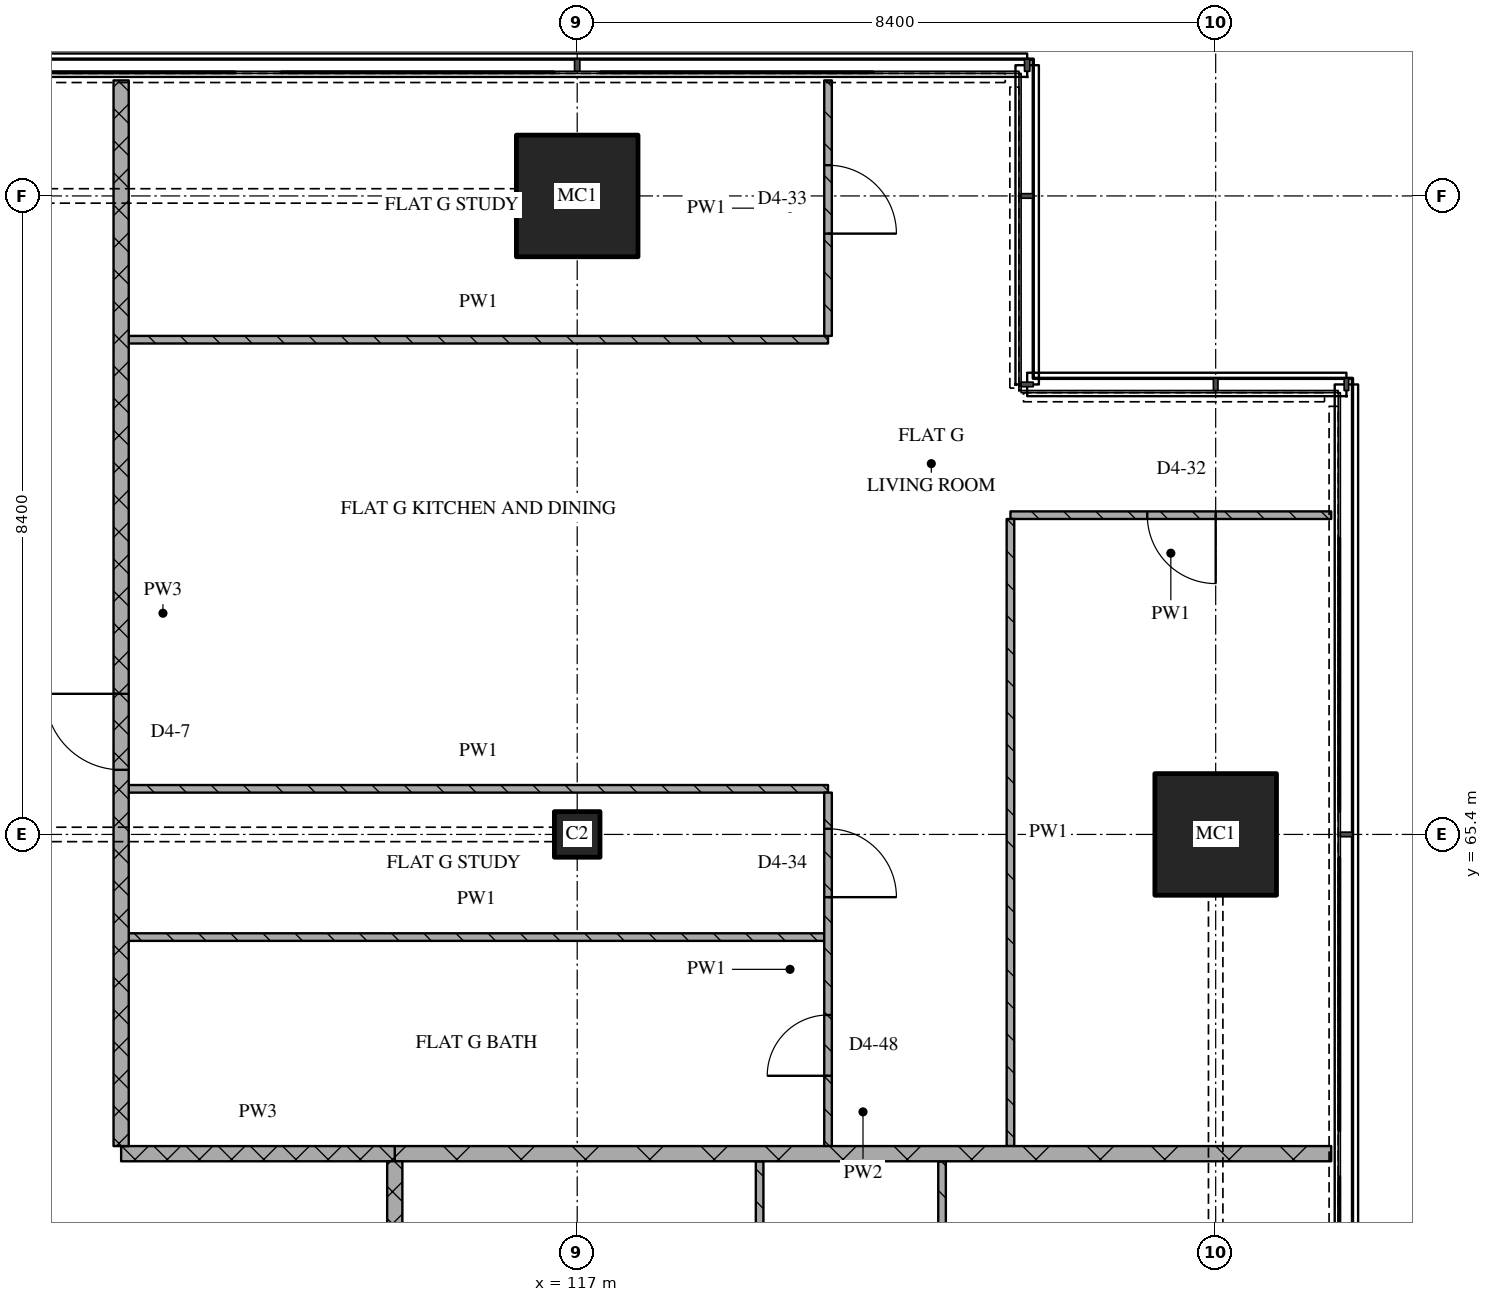
"""IFC4 building model, lengths in metres.
Left out: names, types, materials, properties, quantities, classifications, styles, units other than length and angle.
Written with IfcOpenShell. Run it as: python <this file> out.ifc"""

import sys

from ifc_helpers import new_model, si_unit, direction, frame, frame_2d, origin, origin_2d, place, context, subcontext, project, spatial, rectangle, extrude, element, fill, save


model = new_model("IFC4")
c1 = context("Model", 3, precision=1e-05, world=origin(), true_north=direction((0.0, 1.0)))
c2 = subcontext(c1, "Body", "Model", "MODEL_VIEW")
j1 = project(units=[si_unit("LENGTHUNIT", "METRE"), si_unit("PLANEANGLEUNIT", "RADIAN")], contexts=[c1])
p1 = place(None, origin())
s1 = spatial("IfcSite", under=j1, at=p1, CompositionType="ELEMENT")
p2 = place(p1, origin())
s2 = spatial("IfcBuilding", under=s1, at=p2, CompositionType="ELEMENT")
p3 = place(p2, frame((0.0, 0.0, 241.5)))
s3 = spatial("IfcBuildingStorey", under=s2, at=p3, CompositionType="ELEMENT", Elevation=241.5)
p4 = place(p3, frame((117.0, 65.4, 0.0), z_axis=(0.0, 0.0, 1.0), x_axis=(1.0, 0.0, 0.0)))
e1 = element("IfcColumn", 1, at=p4, inside=s3, PredefinedType="COLUMN", context=c2, shape_type="SweptSolid", body=[
    extrude(rectangle(XDim=0.6, YDim=0.6, at=origin_2d()), origin(), (0.0, 0.0, 1.0), 3.6),
])
for number, where, z_axis, x_axis in (
    (2, (117.0, 73.8, 0.0), (0.0, 0.0, 1.0), (1.0, 0.0, 0.0)),
    (3, (125.4, 65.4, 0.0), (0.0, 0.0, 1.0), (1.0, 0.0, 0.0)),
):
    element("IfcColumn", number, at=place(p3, frame(where, z_axis=z_axis, x_axis=x_axis)), inside=s3, PredefinedType="COLUMN", context=c2, shape_type="SweptSolid", body=[
        extrude(rectangle(XDim=1.6, YDim=1.6, at=origin_2d()), origin(), (0.0, 0.0, 1.0), 3.6),
    ])
p5 = place(p3, frame((111.0, 61.2, 0.0), z_axis=(0.0, 0.0, 1.0), x_axis=(1.0, 0.0, 0.0)))
e4 = element("IfcWall", 4, at=p5, inside=s3, PredefinedType="PARTITIONING", context=c2, shape_type="SweptSolid", body=[
    extrude(rectangle(XDim=3.6, YDim=0.2, at=frame_2d((1.8, 0.0))), origin(), (0.0, 0.0, 1.0), 3.32),
])
p6 = place(p3, frame((114.6, 61.2, 0.0), z_axis=(0.0, 0.0, 1.0), x_axis=(1.0, 0.0, 0.0)))
e5 = element("IfcWall", 5, at=p6, inside=s3, PredefinedType="PARTITIONING", context=c2, shape_type="SweptSolid", body=[
    extrude(rectangle(XDim=12.32, YDim=0.2, at=frame_2d((6.16, 0.0))), origin(), (0.0, 0.0, 1.0), 3.32),
])
p7 = place(p3, frame((111.1, 64.05, 0.0), z_axis=(0.0, 0.0, 1.0), x_axis=(1.0, 0.0, 0.0)))
e6 = element("IfcWall", 6, at=p7, inside=s3, PredefinedType="PARTITIONING", context=c2, shape_type="SweptSolid", body=[
    extrude(rectangle(XDim=9.15, YDim=0.1, at=frame_2d((4.575, 0.0))), origin(), (0.0, 0.0, 1.0), 3.32),
])
p8 = place(p3, frame((111.1, 66.0, 0.0), z_axis=(0.0, 0.0, 1.0), x_axis=(1.0, 0.0, 0.0)))
e7 = element("IfcWall", 7, at=p8, inside=s3, PredefinedType="PARTITIONING", context=c2, shape_type="SweptSolid", body=[
    extrude(rectangle(XDim=9.2, YDim=0.1, at=frame_2d((4.6, 0.0))), origin(), (0.0, 0.0, 1.0), 3.32),
])
p9 = place(p3, frame((126.92, 69.6, 0.0), z_axis=(0.0, 0.0, 1.0), x_axis=(-1.0, 0.0, 0.0)))
e8 = element("IfcWall", 8, at=p9, inside=s3, PredefinedType="PARTITIONING", context=c2, shape_type="SweptSolid", body=[
    extrude(rectangle(XDim=4.22, YDim=0.1, at=frame_2d((2.11, 0.0))), origin(), (0.0, 0.0, 1.0), 3.32),
])
p10 = place(p9, frame((1.52, 0.0, 0.0)))
e9 = element("IfcOpeningElement", 9, at=p10, cuts=e8, PredefinedType="OPENING", context=c2, shape_type="SweptSolid", body=[
    extrude(rectangle(XDim=0.9, YDim=2.1, at=frame_2d((0.45, 1.05))), frame((0.0, 0.06, 0.0), z_axis=(0.0, -1.0, 0.0), x_axis=(1.0, 0.0, 0.0)), (0.0, 0.0, 1.0), 0.12),
])
p11 = place(p3, frame((111.1, 71.909, 0.0), z_axis=(0.0, 0.0, 1.0), x_axis=(1.0, 0.0, 0.0)))
e10 = element("IfcWall", 10, at=p11, inside=s3, PredefinedType="PARTITIONING", context=c2, shape_type="SweptSolid", body=[
    extrude(rectangle(XDim=9.2, YDim=0.1, at=frame_2d((4.6, 0.0))), origin(), (0.0, 0.0, 1.0), 3.32),
])
p12 = place(p3, frame((111.0, 75.32, 0.0), z_axis=(0.0, 0.0, 1.0), x_axis=(0.0, -1.0, 0.0)))
e11 = element("IfcWall", 11, at=p12, inside=s3, PredefinedType="PARTITIONING", context=c2, shape_type="SweptSolid", body=[
    extrude(rectangle(XDim=14.02, YDim=0.2, at=frame_2d((7.01, 0.0))), origin(), (0.0, 0.0, 1.0), 3.32),
])
p13 = place(p12, frame((8.07, 0.0, 0.0)))
e12 = element("IfcOpeningElement", 12, at=p13, cuts=e11, PredefinedType="OPENING", context=c2, shape_type="SweptSolid", body=[
    extrude(rectangle(XDim=1.0, YDim=2.1, at=frame_2d((0.5, 1.05))), frame((0.0, 0.11, 0.0), z_axis=(0.0, -1.0, 0.0), x_axis=(1.0, 0.0, 0.0)), (0.0, 0.0, 1.0), 0.22),
])
p14 = place(p3, frame((114.6, 61.1, 0.0), z_axis=(0.0, 0.0, 1.0), x_axis=(0.0, -1.0, 0.0)))
e13 = element("IfcWall", 13, at=p14, inside=s3, PredefinedType="PARTITIONING", context=c2, shape_type="SweptSolid", body=[
    extrude(rectangle(XDim=17.8, YDim=0.2, at=frame_2d((8.9, 0.0))), origin(), (0.0, 0.0, 1.0), 3.32),
])
p15 = place(p3, frame((119.4, 57.35, 0.0), z_axis=(0.0, 0.0, 1.0), x_axis=(0.0, 1.0, 0.0)))
e14 = element("IfcWall", 14, at=p15, inside=s3, PredefinedType="PARTITIONING", context=c2, shape_type="SweptSolid", body=[
    extrude(rectangle(XDim=3.75, YDim=0.1, at=frame_2d((1.875, 0.0))), origin(), (0.0, 0.0, 1.0), 3.32),
])
p16 = place(p15, frame((1.45, 0.0, 0.0)))
e15 = element("IfcOpeningElement", 15, at=p16, cuts=e14, PredefinedType="OPENING", context=c2, shape_type="SweptSolid", body=[
    extrude(rectangle(XDim=0.9, YDim=2.1, at=frame_2d((0.45, 1.05))), frame((0.0, 0.06, 0.0), z_axis=(0.0, -1.0, 0.0), x_axis=(1.0, 0.0, 0.0)), (0.0, 0.0, 1.0), 0.12),
])
p17 = place(p3, frame((120.3, 61.3, 0.0), z_axis=(0.0, 0.0, 1.0), x_axis=(0.0, 1.0, 0.0)))
e16 = element("IfcWall", 16, at=p17, inside=s3, PredefinedType="PARTITIONING", context=c2, shape_type="SweptSolid", body=[
    extrude(rectangle(XDim=4.65, YDim=0.1, at=frame_2d((2.325, 0.0))), origin(), (0.0, 0.0, 1.0), 3.32),
])
p18 = place(p17, frame((0.925, 0.0, 0.0)))
e17 = element("IfcOpeningElement", 17, at=p18, cuts=e16, PredefinedType="OPENING", context=c2, shape_type="SweptSolid", body=[
    extrude(rectangle(XDim=0.8, YDim=2.1, at=frame_2d((0.4, 1.05))), frame((0.0, 0.06, 0.0), z_axis=(0.0, -1.0, 0.0), x_axis=(1.0, 0.0, 0.0)), (0.0, 0.0, 1.0), 0.12),
])
p19 = place(p17, frame((3.275, 0.0, 0.0)))
e18 = element("IfcOpeningElement", 18, at=p19, cuts=e16, PredefinedType="OPENING", context=c2, shape_type="SweptSolid", body=[
    extrude(rectangle(XDim=0.9, YDim=2.1, at=frame_2d((0.45, 1.05))), frame((0.0, 0.06, 0.0), z_axis=(0.0, -1.0, 0.0), x_axis=(1.0, 0.0, 0.0)), (0.0, 0.0, 1.0), 0.12),
])
p20 = place(p3, frame((120.3, 71.958, 0.0), z_axis=(0.0, 0.0, 1.0), x_axis=(0.0, 1.0, 0.0)))
e19 = element("IfcWall", 19, at=p20, inside=s3, PredefinedType="PARTITIONING", context=c2, shape_type="SweptSolid", body=[
    extrude(rectangle(XDim=3.362, YDim=0.1, at=frame_2d((1.681, 0.0))), origin(), (0.0, 0.0, 1.0), 3.32),
])
p21 = place(p20, frame((1.346, 0.0, 0.0)))
e20 = element("IfcOpeningElement", 20, at=p21, cuts=e19, PredefinedType="OPENING", context=c2, shape_type="SweptSolid", body=[
    extrude(rectangle(XDim=0.9, YDim=2.1, at=frame_2d((0.45, 1.05))), frame((0.0, 0.06, 0.0), z_axis=(0.0, -1.0, 0.0), x_axis=(1.0, 0.0, 0.0)), (0.0, 0.0, 1.0), 0.12),
])
for number, where, z_axis, x_axis in (
    (21, (121.8, 61.1, 0.0), (0.0, 0.0, 1.0), (0.0, -1.0, 0.0)),
    (22, (122.7, 69.55, 0.0), (0.0, 0.0, 1.0), (0.0, -1.0, 0.0)),
):
    element("IfcWall", number, at=place(p3, frame(where, z_axis=z_axis, x_axis=x_axis)), inside=s3, PredefinedType="PARTITIONING", context=c2, shape_type="SweptSolid", body=[
        extrude(rectangle(XDim=8.25, YDim=0.1, at=frame_2d((4.125, 0.0))), origin(), (0.0, 0.0, 1.0), 3.32),
    ])
p22 = place(p10, origin())
e23 = element("IfcDoor", 23, at=p22, inside=s3, OperationType="SINGLE_SWING_LEFT", PredefinedType="DOOR", context=c2, shape_type="SweptSolid", body=[
    extrude(rectangle(XDim=0.9, YDim=2.1, at=frame_2d((0.45, 1.05))), frame((0.0, 0.025, 0.0), z_axis=(0.0, -1.0, 0.0), x_axis=(1.0, 0.0, 0.0)), (0.0, 0.0, 1.0), 0.05),
])
fill(e9, e23)
p23 = place(p13, origin())
e24 = element("IfcDoor", 24, at=p23, inside=s3, OperationType="SINGLE_SWING_RIGHT", PredefinedType="DOOR", context=c2, shape_type="SweptSolid", body=[
    extrude(rectangle(XDim=1.0, YDim=2.1, at=frame_2d((0.5, 1.05))), frame((0.0, 0.025, 0.0), z_axis=(0.0, -1.0, 0.0), x_axis=(1.0, 0.0, 0.0)), (0.0, 0.0, 1.0), 0.05),
])
fill(e12, e24)
p24 = place(p18, origin())
e25 = element("IfcDoor", 25, at=p24, inside=s3, OperationType="SINGLE_SWING_LEFT", PredefinedType="DOOR", context=c2, shape_type="SweptSolid", body=[
    extrude(rectangle(XDim=0.8, YDim=2.1, at=frame_2d((0.4, 1.05))), frame((0.0, 0.025, 0.0), z_axis=(0.0, -1.0, 0.0), x_axis=(1.0, 0.0, 0.0)), (0.0, 0.0, 1.0), 0.05),
])
fill(e17, e25)
p25 = place(p19, origin())
e26 = element("IfcDoor", 26, at=p25, inside=s3, OperationType="SINGLE_SWING_RIGHT", PredefinedType="DOOR", context=c2, shape_type="SweptSolid", body=[
    extrude(rectangle(XDim=0.9, YDim=2.1, at=frame_2d((0.45, 1.05))), frame((0.0, 0.025, 0.0), z_axis=(0.0, -1.0, 0.0), x_axis=(1.0, 0.0, 0.0)), (0.0, 0.0, 1.0), 0.05),
])
fill(e18, e26)
p26 = place(p21, origin())
e27 = element("IfcDoor", 27, at=p26, inside=s3, OperationType="SINGLE_SWING_RIGHT", PredefinedType="DOOR", context=c2, shape_type="SweptSolid", body=[
    extrude(rectangle(XDim=0.9, YDim=2.1, at=frame_2d((0.45, 1.05))), frame((0.0, 0.025, 0.0), z_axis=(0.0, -1.0, 0.0), x_axis=(1.0, 0.0, 0.0)), (0.0, 0.0, 1.0), 0.05),
])
fill(e20, e27)
save(model, sys.argv[1])
